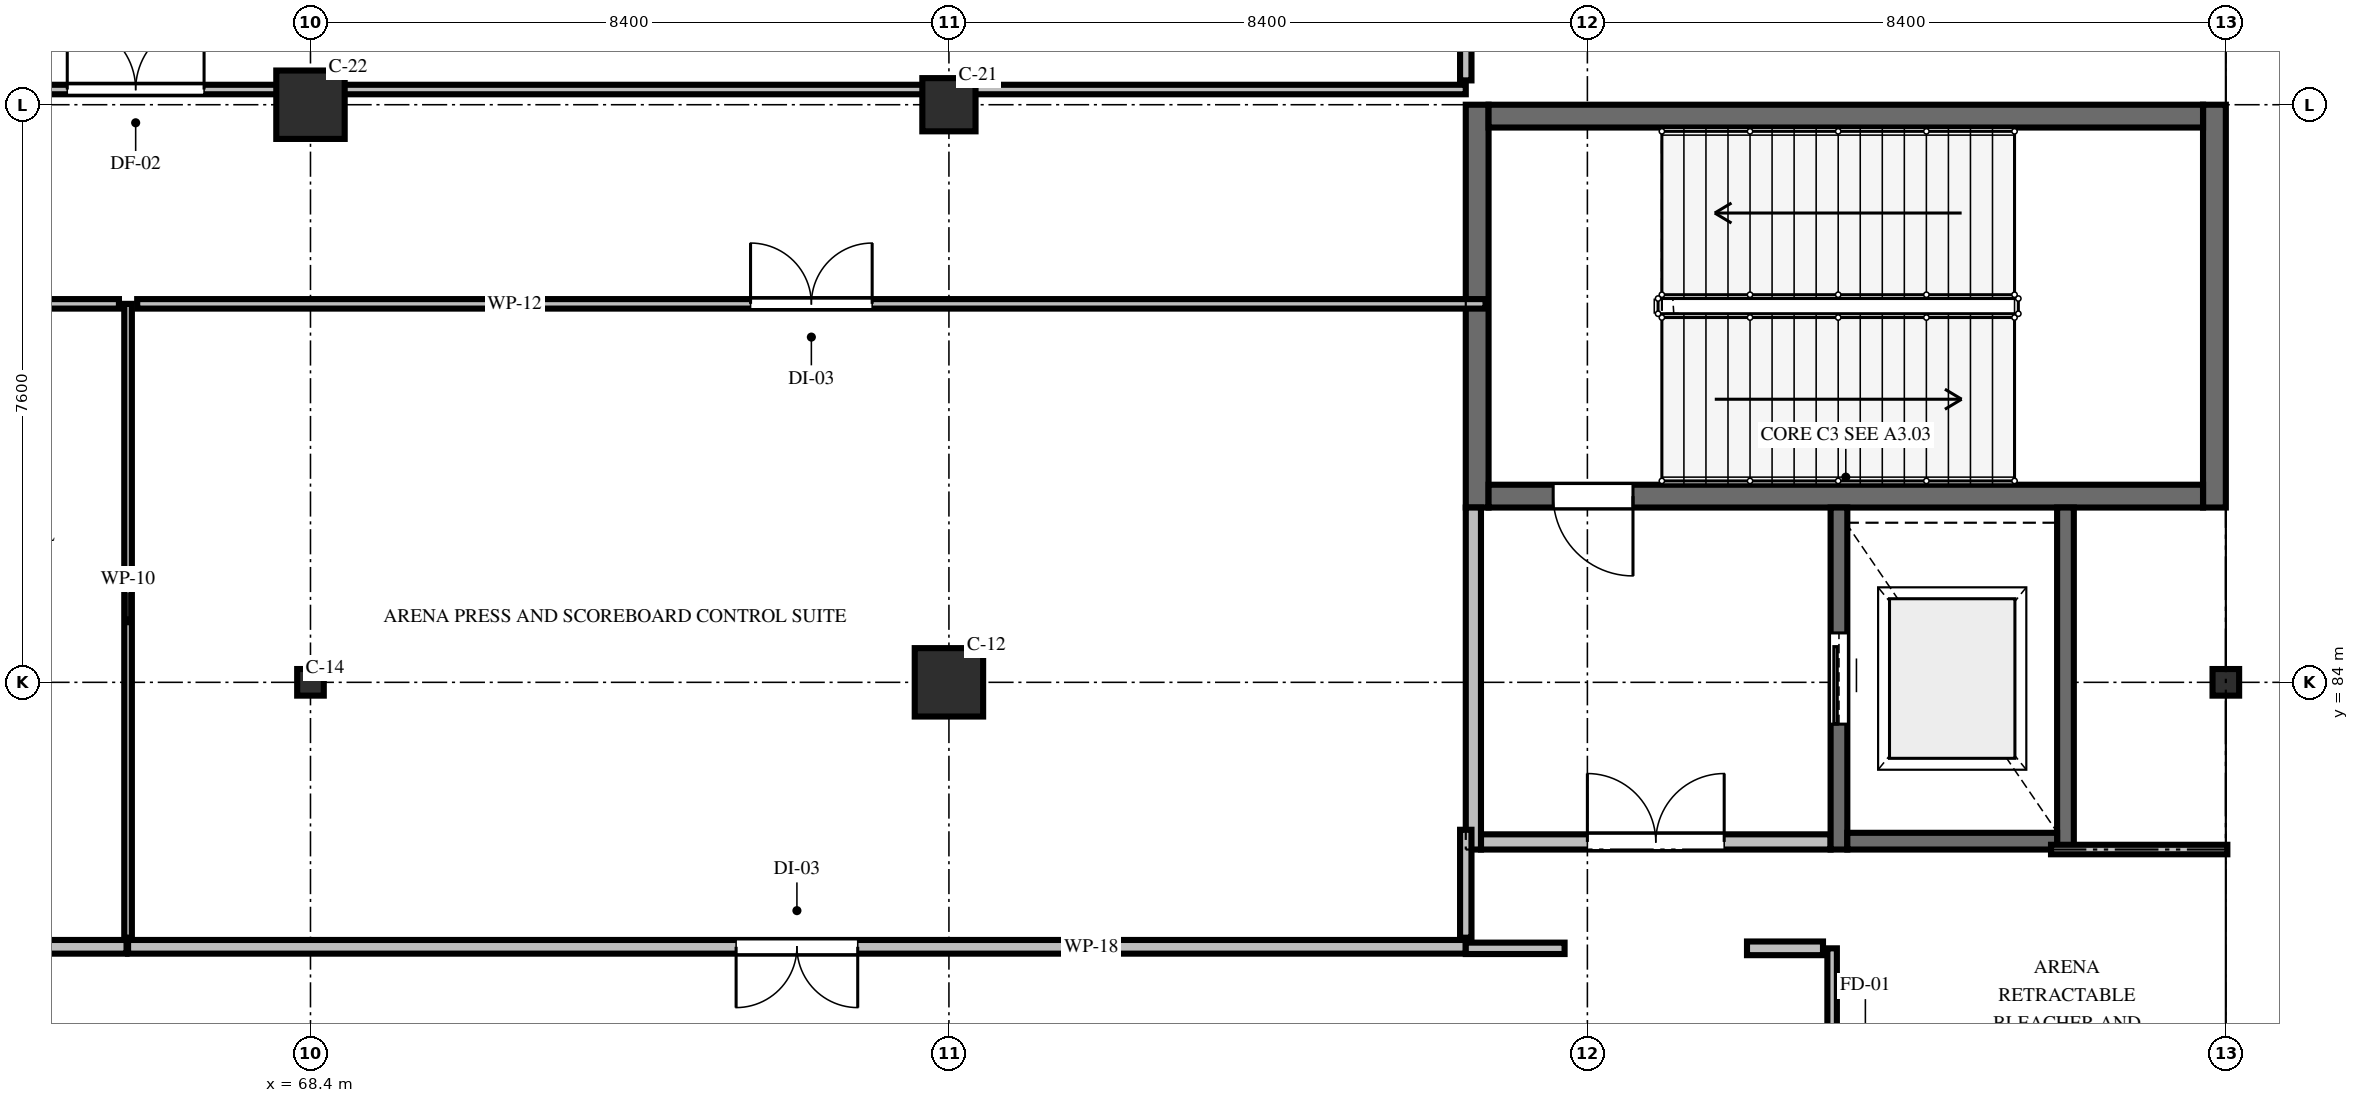
"""IFC4 building model, lengths in metres.
Left out: names, types, materials, properties, quantities, classifications, styles, units other than length and angle.
Written with IfcOpenShell. Run it as: python <this file> out.ifc"""

import sys

from ifc_helpers import new_model, si_unit, direction, frame, frame_2d, origin, origin_2d, place, context, subcontext, project, spatial, rectangle, hollow_rectangle, circle, i_section, extrude, element, fill, save


model = new_model("IFC4")
c1 = context("Model", 3, precision=1e-05, world=origin(), true_north=direction((0.0, 1.0)))
c2 = subcontext(c1, "Body", "Model", "MODEL_VIEW")
j1 = project(units=[si_unit("LENGTHUNIT", "METRE"), si_unit("PLANEANGLEUNIT", "RADIAN")], contexts=[c1])
p1 = place(None, origin())
s1 = spatial("IfcSite", under=j1, at=p1, CompositionType="ELEMENT")
p2 = place(p1, origin())
s2 = spatial("IfcBuilding", under=s1, at=p2, CompositionType="ELEMENT")
p3 = place(p2, frame((0.0, 0.0, 10.8)))
s3 = spatial("IfcBuildingStorey", under=s2, at=p3, CompositionType="ELEMENT", Elevation=10.8)
p4 = place(p3, frame((68.4, 84.0, 0.0), z_axis=(0.0, 0.0, 1.0), x_axis=(1.0, 0.0, 0.0)))
e1 = element("IfcColumn", 1, at=p4, inside=s3, PredefinedType="COLUMN", context=c2, shape_type="SweptSolid", body=[
    extrude(i_section(OverallWidth=0.35, OverallDepth=0.35, WebThickness=0.012, FlangeThickness=0.019, FilletRadius=0.013, at=origin_2d()), origin(), (0.0, 0.0, 1.0), 6.0),
])
p5 = place(p3, frame((68.4, 91.6, 0.0), z_axis=(0.0, 0.0, 1.0), x_axis=(1.0, 0.0, 0.0)))
e2 = element("IfcColumn", 2, at=p5, inside=s3, PredefinedType="COLUMN", context=c2, shape_type="SweptSolid", body=[
    extrude(hollow_rectangle(XDim=0.9, YDim=0.9, WallThickness=0.036, InnerFilletRadius=0.036, OuterFilletRadius=0.072, at=origin_2d()), origin(), (0.0, 0.0, 1.0), 6.0),
])
p6 = place(p3, frame((76.8, 84.0, 0.0), z_axis=(0.0, 0.0, 1.0), x_axis=(1.0, 0.0, 0.0)))
e3 = element("IfcColumn", 3, at=p6, inside=s3, PredefinedType="COLUMN", context=c2, shape_type="SweptSolid", body=[
    extrude(circle(Radius=0.45, at=origin_2d()), origin(), (0.0, 0.0, 1.0), 6.0),
])
p7 = place(p3, frame((76.8, 91.6, 0.0), z_axis=(0.0, 0.0, 1.0), x_axis=(1.0, 0.0, 0.0)))
e4 = element("IfcColumn", 4, at=p7, inside=s3, PredefinedType="COLUMN", context=c2, shape_type="SweptSolid", body=[
    extrude(hollow_rectangle(XDim=0.7, YDim=0.7, WallThickness=0.028, InnerFilletRadius=0.028, OuterFilletRadius=0.056, at=origin_2d()), origin(), (0.0, 0.0, 1.0), 6.0),
])
p8 = place(p3, frame((93.6, 84.0, 0.0), z_axis=(0.0, 0.0, 1.0), x_axis=(1.0, 0.0, 0.0)))
e5 = element("IfcColumn", 5, at=p8, inside=s3, PredefinedType="COLUMN", context=c2, shape_type="SweptSolid", body=[
    extrude(i_section(OverallWidth=0.35, OverallDepth=0.35, WebThickness=0.012, FlangeThickness=0.019, FilletRadius=0.013, at=origin_2d()), origin(), (0.0, 0.0, 1.0), 6.0),
])
for number, where, z_axis, x_axis in (
    (6, (83.75, 86.3, 0.0), (0.0, 0.0, 1.0), (0.0, 1.0, 0.0)),
    (7, (93.45, 91.6, 0.0), (0.0, 0.0, 1.0), (0.0, -1.0, 0.0)),
):
    element("IfcWall", number, at=place(p3, frame(where, z_axis=z_axis, x_axis=x_axis)), inside=s3, PredefinedType="SHEAR", context=c2, shape_type="SweptSolid", body=[
        extrude(rectangle(XDim=5.3, YDim=0.3, at=frame_2d((2.65, 0.0))), origin(), (0.0, 0.0, 1.0), 5.68),
    ])
p9 = place(p3, frame((93.3, 86.45, 0.0), z_axis=(0.0, 0.0, 1.0), x_axis=(-1.0, 0.0, 0.0)))
e8 = element("IfcWall", 8, at=p9, inside=s3, PredefinedType="SHEAR", context=c2, shape_type="SweptSolid", body=[
    extrude(rectangle(XDim=9.4, YDim=0.3, at=frame_2d((4.7, 0.0))), origin(), (0.0, 0.0, 1.0), 5.68),
])
p10 = place(p9, frame((7.5, 0.0, 0.0)))
e9 = element("IfcOpeningElement", 9, at=p10, cuts=e8, PredefinedType="OPENING", context=c2, shape_type="SweptSolid", body=[
    extrude(rectangle(XDim=1.05, YDim=2.2, at=frame_2d((0.525, 1.1))), frame((0.0, 0.16, 0.0), z_axis=(0.0, -1.0, 0.0), x_axis=(1.0, 0.0, 0.0)), (0.0, 0.0, 1.0), 0.32),
])
p11 = place(p3, frame((83.9, 91.45, 0.0), z_axis=(0.0, 0.0, 1.0), x_axis=(1.0, 0.0, 0.0)))
e10 = element("IfcWall", 10, at=p11, inside=s3, PredefinedType="SHEAR", context=c2, shape_type="SweptSolid", body=[
    extrude(rectangle(XDim=9.4, YDim=0.3, at=frame_2d((4.7, 0.0))), origin(), (0.0, 0.0, 1.0), 5.68),
])
p12 = place(p3, frame((83.8, 81.9, 0.0), z_axis=(0.0, 0.0, 1.0), x_axis=(1.0, 0.0, 0.0)))
e11 = element("IfcWall", 11, at=p12, inside=s3, PredefinedType="SOLIDWALL", context=c2, shape_type="SweptSolid", body=[
    extrude(rectangle(XDim=4.6, YDim=0.2, at=frame_2d((2.3, 0.0))), origin(), (0.0, 0.0, 1.0), 4.958),
])
p13 = place(p12, frame((1.4, 0.0, 0.0)))
e12 = element("IfcOpeningElement", 12, at=p13, cuts=e11, PredefinedType="OPENING", context=c2, shape_type="SweptSolid", body=[
    extrude(rectangle(XDim=1.8, YDim=2.2, at=frame_2d((0.9, 1.1))), frame((0.0, 0.11, 0.0), z_axis=(0.0, -1.0, 0.0), x_axis=(1.0, 0.0, 0.0)), (0.0, 0.0, 1.0), 0.22),
])
p14 = place(p3, frame((83.7, 81.8, 0.0), z_axis=(0.0, 0.0, 1.0), x_axis=(0.0, 1.0, 0.0)))
e13 = element("IfcWall", 13, at=p14, inside=s3, PredefinedType="SOLIDWALL", context=c2, shape_type="SweptSolid", body=[
    extrude(rectangle(XDim=4.5, YDim=0.2, at=frame_2d((2.25, 0.0))), origin(), (0.0, 0.0, 1.0), 4.958),
])
p15 = place(p3, frame((88.51, 81.8, 0.0), z_axis=(0.0, 0.0, 1.0), x_axis=(0.0, 1.0, 0.0)))
e14 = element("IfcWall", 14, at=p15, inside=s3, PredefinedType="SOLIDWALL", context=c2, shape_type="SweptSolid", body=[
    extrude(rectangle(XDim=4.5, YDim=0.22, at=frame_2d((2.25, 0.0))), origin(), (0.0, 0.0, 1.0), 5.68),
])
p16 = place(p15, frame((1.65, 0.0, 0.0)))
e15 = element("IfcOpeningElement", 15, at=p16, cuts=e14, PredefinedType="OPENING", context=c2, shape_type="SweptSolid", body=[
    extrude(rectangle(XDim=1.2, YDim=2.2, at=frame_2d((0.6, 1.1))), frame((0.0, 0.12, 0.0), z_axis=(0.0, -1.0, 0.0), x_axis=(1.0, 0.0, 0.0)), (0.0, 0.0, 1.0), 0.24),
])
p17 = place(p3, frame((91.49, 81.8, 0.0), z_axis=(0.0, 0.0, 1.0), x_axis=(0.0, 1.0, 0.0)))
e16 = element("IfcWall", 16, at=p17, inside=s3, PredefinedType="SOLIDWALL", context=c2, shape_type="SweptSolid", body=[
    extrude(rectangle(XDim=4.5, YDim=0.22, at=frame_2d((2.25, 0.0))), origin(), (0.0, 0.0, 1.0), 5.68),
])
p18 = place(p3, frame((88.62, 81.91, 0.0), z_axis=(0.0, 0.0, 1.0), x_axis=(1.0, 0.0, 0.0)))
e17 = element("IfcWall", 17, at=p18, inside=s3, PredefinedType="SOLIDWALL", context=c2, shape_type="SweptSolid", body=[
    extrude(rectangle(XDim=2.76, YDim=0.22, at=frame_2d((1.38, 0.0))), origin(), (0.0, 0.0, 1.0), 5.68),
])
p19 = place(p3, frame((83.6, 80.52, 0.0), z_axis=(0.0, 0.0, 1.0), x_axis=(-1.0, 0.0, 0.0)))
e18 = element("IfcWall", 18, at=p19, inside=s3, PredefinedType="PARTITIONING", context=c2, shape_type="SweptSolid", body=[
    extrude(rectangle(XDim=17.6, YDim=0.18, at=frame_2d((8.8, 0.0))), origin(), (0.0, 0.0, 1.0), 5.162),
])
p20 = place(p19, frame((8.0, 0.0, 0.0)))
e19 = element("IfcOpeningElement", 19, at=p20, cuts=e18, PredefinedType="OPENING", context=c2, shape_type="SweptSolid", body=[
    extrude(rectangle(XDim=1.6, YDim=2.2, at=frame_2d((0.8, 1.1))), frame((0.0, 0.1, 0.0), z_axis=(0.0, -1.0, 0.0), x_axis=(1.0, 0.0, 0.0)), (0.0, 0.0, 1.0), 0.2),
])
p21 = place(p3, frame((66.0, 80.64, 0.0), z_axis=(0.0, 0.0, 1.0), x_axis=(0.0, 1.0, 0.0)))
e20 = element("IfcWall", 20, at=p21, inside=s3, PredefinedType="PARTITIONING", context=c2, shape_type="SweptSolid", body=[
    extrude(rectangle(XDim=8.34, YDim=0.1, at=frame_2d((4.17, 0.0))), origin(), (0.0, 0.0, 1.0), 5.062),
])
p22 = place(p3, frame((66.12, 88.98, 0.0), z_axis=(0.0, 0.0, 1.0), x_axis=(1.0, 0.0, 0.0)))
e21 = element("IfcWall", 21, at=p22, inside=s3, PredefinedType="PARTITIONING", context=c2, shape_type="SweptSolid", body=[
    extrude(rectangle(XDim=17.74, YDim=0.125, at=frame_2d((8.87, 0.0))), origin(), (0.0, 0.0, 1.0), 5.068),
])
p23 = place(p22, frame((8.07, 0.0, 0.0)))
e22 = element("IfcOpeningElement", 22, at=p23, cuts=e21, PredefinedType="OPENING", context=c2, shape_type="SweptSolid", body=[
    extrude(rectangle(XDim=1.6, YDim=2.2, at=frame_2d((0.8, 1.1))), frame((0.0, 0.073, 0.0), z_axis=(0.0, -1.0, 0.0), x_axis=(1.0, 0.0, 0.0)), (0.0, 0.0, 1.0), 0.145),
])
p24 = place(p3, frame((83.6, 82.06, 0.0), z_axis=(0.0, 0.0, 1.0), x_axis=(0.0, -1.0, 0.0)))
e23 = element("IfcWall", 23, at=p24, inside=s3, PredefinedType="PARTITIONING", context=c2, shape_type="SweptSolid", body=[
    extrude(rectangle(XDim=1.42, YDim=0.15, at=frame_2d((0.71, 0.0))), origin(), (0.0, 0.0, 1.0), 5.65),
])
p25 = place(p3, frame((65.98, 80.52, 0.0), z_axis=(0.0, 0.0, 1.0), x_axis=(-1.0, 0.0, 0.0)))
e24 = element("IfcWall", 24, at=p25, inside=s3, PredefinedType="PARTITIONING", context=c2, shape_type="SweptSolid", body=[
    extrude(rectangle(XDim=17.36, YDim=0.18, at=frame_2d((8.68, 0.0))), origin(), (0.0, 0.0, 1.0), 4.85),
])
p26 = place(p25, frame((7.88, 0.0, 0.0)))
e25 = element("IfcOpeningElement", 25, at=p26, cuts=e24, PredefinedType="OPENING", context=c2, shape_type="SweptSolid", body=[
    extrude(rectangle(XDim=1.6, YDim=2.2, at=frame_2d((0.8, 1.1))), frame((0.0, 0.1, 0.0), z_axis=(0.0, -1.0, 0.0), x_axis=(1.0, 0.0, 0.0)), (0.0, 0.0, 1.0), 0.2),
])
p27 = place(p3, frame((48.74, 88.98, 0.0), z_axis=(0.0, 0.0, 1.0), x_axis=(1.0, 0.0, 0.0)))
e26 = element("IfcWall", 26, at=p27, inside=s3, PredefinedType="PARTITIONING", context=c2, shape_type="SweptSolid", body=[
    extrude(rectangle(XDim=17.14, YDim=0.125, at=frame_2d((8.57, 0.0))), origin(), (0.0, 0.0, 1.0), 4.76),
])
p28 = place(p27, frame((7.77, 0.0, 0.0)))
e27 = element("IfcOpeningElement", 27, at=p28, cuts=e26, PredefinedType="OPENING", context=c2, shape_type="SweptSolid", body=[
    extrude(rectangle(XDim=1.6, YDim=2.2, at=frame_2d((0.8, 1.1))), frame((0.0, 0.073, 0.0), z_axis=(0.0, -1.0, 0.0), x_axis=(1.0, 0.0, 0.0)), (0.0, 0.0, 1.0), 0.145),
])
p29 = place(p3, frame((88.42, 75.72, 0.0), z_axis=(0.0, 0.0, 1.0), x_axis=(0.0, 1.0, 0.0)))
e28 = element("IfcWall", 28, at=p29, inside=s3, PredefinedType="PARTITIONING", context=c2, shape_type="SweptSolid", body=[
    extrude(rectangle(XDim=4.78, YDim=0.125, at=frame_2d((2.39, 0.0))), origin(), (0.0, 0.0, 1.0), 5.26),
])
p30 = place(p29, frame((1.19, 0.0, 0.0)))
e29 = element("IfcOpeningElement", 29, at=p30, cuts=e28, PredefinedType="OPENING", context=c2, shape_type="SweptSolid", body=[
    extrude(rectangle(XDim=2.4, YDim=2.3, at=frame_2d((1.2, 1.15))), frame((0.0, 0.073, 0.0), z_axis=(0.0, -1.0, 0.0), x_axis=(1.0, 0.0, 0.0)), (0.0, 0.0, 1.0), 0.145),
])
p31 = place(p3, frame((91.3, 81.8, 0.0), z_axis=(0.0, 0.0, 1.0), x_axis=(1.0, 0.0, 0.0)))
e30 = element("IfcWall", 30, at=p31, inside=s3, PredefinedType="PARTITIONING", context=c2, shape_type="SweptSolid", body=[
    extrude(rectangle(XDim=2.32, YDim=0.125, at=frame_2d((1.16, 0.0))), origin(), (0.0, 0.0, 1.0), 4.9),
])
p32 = place(p3, frame((48.6, 91.8, 0.0), z_axis=(0.0, 0.0, 1.0), x_axis=(1.0, 0.0, 0.0)))
e31 = element("IfcWall", 31, at=p32, inside=s3, PredefinedType="PARTITIONING", context=c2, shape_type="SweptSolid", body=[
    extrude(rectangle(XDim=35.0, YDim=0.125, at=frame_2d((17.5, 0.0))), origin(), (0.0, 0.0, 1.0), 4.8),
])
p33 = place(p32, frame((16.6, 0.0, 0.0)))
e32 = element("IfcOpeningElement", 32, at=p33, cuts=e31, PredefinedType="OPENING", context=c2, shape_type="SweptSolid", body=[
    extrude(rectangle(XDim=1.8, YDim=2.2, at=frame_2d((0.9, 1.1))), frame((0.0, 0.073, 0.0), z_axis=(0.0, -1.0, 0.0), x_axis=(1.0, 0.0, 0.0)), (0.0, 0.0, 1.0), 0.145),
])
p34 = place(p3, frame((83.6, 80.5, 0.0), z_axis=(0.0, 0.0, 1.0), x_axis=(1.0, 0.0, 0.0)))
e33 = element("IfcWall", 33, at=p34, inside=s3, PredefinedType="PARTITIONING", context=c2, shape_type="SweptSolid", body=[
    extrude(rectangle(XDim=1.3, YDim=0.15, at=frame_2d((0.65, 0.0))), origin(), (0.0, 0.0, 1.0), 5.65),
])
p35 = place(p3, frame((87.3, 80.5, 0.0), z_axis=(0.0, 0.0, 1.0), x_axis=(1.0, 0.0, 0.0)))
e34 = element("IfcWall", 34, at=p35, inside=s3, PredefinedType="PARTITIONING", context=c2, shape_type="SweptSolid", body=[
    extrude(rectangle(XDim=1.0, YDim=0.18, at=frame_2d((0.5, 0.0))), origin(), (0.0, 0.0, 1.0), 5.65),
])
p36 = place(p3, frame((83.6, 103.815, 0.0), z_axis=(0.0, 0.0, 1.0), x_axis=(0.0, -1.0, 0.0)))
e35 = element("IfcWall", 35, at=p36, inside=s3, PredefinedType="PARTITIONING", context=c2, shape_type="SweptSolid", body=[
    extrude(rectangle(XDim=11.895, YDim=0.15, at=frame_2d((5.948, 0.0))), origin(), (0.0, 0.0, 1.0), 5.65),
])
p37 = place(p10, origin())
e36 = element("IfcDoor", 36, at=p37, inside=s3, OperationType="SINGLE_SWING_LEFT", PredefinedType="DOOR", context=c2, shape_type="SweptSolid", body=[
    extrude(rectangle(XDim=1.05, YDim=2.2, at=frame_2d((0.525, 1.1))), frame((0.0, 0.025, 0.0), z_axis=(0.0, -1.0, 0.0), x_axis=(1.0, 0.0, 0.0)), (0.0, 0.0, 1.0), 0.05),
])
fill(e9, e36)
p38 = place(p13, origin())
e37 = element("IfcDoor", 37, at=p38, inside=s3, OperationType="DOUBLE_DOOR_SINGLE_SWING", PredefinedType="DOOR", context=c2, shape_type="SweptSolid", body=[
    extrude(rectangle(XDim=1.8, YDim=2.2, at=frame_2d((0.9, 1.1))), frame((0.0, 0.025, 0.0), z_axis=(0.0, -1.0, 0.0), x_axis=(1.0, 0.0, 0.0)), (0.0, 0.0, 1.0), 0.05),
])
fill(e12, e37)
p39 = place(p16, origin())
e38 = element("IfcDoor", 38, at=p39, inside=s3, OperationType="SLIDING_TO_LEFT", PredefinedType="DOOR", context=c2, shape_type="SweptSolid", body=[
    extrude(rectangle(XDim=1.2, YDim=2.2, at=frame_2d((0.6, 1.1))), frame((0.0, 0.025, 0.0), z_axis=(0.0, -1.0, 0.0), x_axis=(1.0, 0.0, 0.0)), (0.0, 0.0, 1.0), 0.05),
])
fill(e15, e38)
p40 = place(p23, origin())
e39 = element("IfcDoor", 39, at=p40, inside=s3, OperationType="DOUBLE_DOOR_SINGLE_SWING", PredefinedType="DOOR", context=c2, shape_type="SweptSolid", body=[
    extrude(rectangle(XDim=1.6, YDim=2.2, at=frame_2d((0.8, 1.1))), frame((0.0, 0.025, 0.0), z_axis=(0.0, -1.0, 0.0), x_axis=(1.0, 0.0, 0.0)), (0.0, 0.0, 1.0), 0.05),
])
fill(e22, e39)
p41 = place(p20, origin())
e40 = element("IfcDoor", 40, at=p41, inside=s3, OperationType="DOUBLE_DOOR_SINGLE_SWING", PredefinedType="DOOR", context=c2, shape_type="SweptSolid", body=[
    extrude(rectangle(XDim=1.6, YDim=2.2, at=frame_2d((0.8, 1.1))), frame((0.0, 0.025, 0.0), z_axis=(0.0, -1.0, 0.0), x_axis=(1.0, 0.0, 0.0)), (0.0, 0.0, 1.0), 0.05),
])
fill(e19, e40)
p42 = place(p33, origin())
e41 = element("IfcDoor", 41, at=p42, inside=s3, OperationType="DOUBLE_DOOR_SINGLE_SWING", PredefinedType="DOOR", context=c2, shape_type="SweptSolid", body=[
    extrude(rectangle(XDim=1.8, YDim=2.2, at=frame_2d((0.9, 1.1))), frame((0.0, 0.025, 0.0), z_axis=(0.0, -1.0, 0.0), x_axis=(1.0, 0.0, 0.0)), (0.0, 0.0, 1.0), 0.05),
])
fill(e32, e41)
save(model, sys.argv[1])
